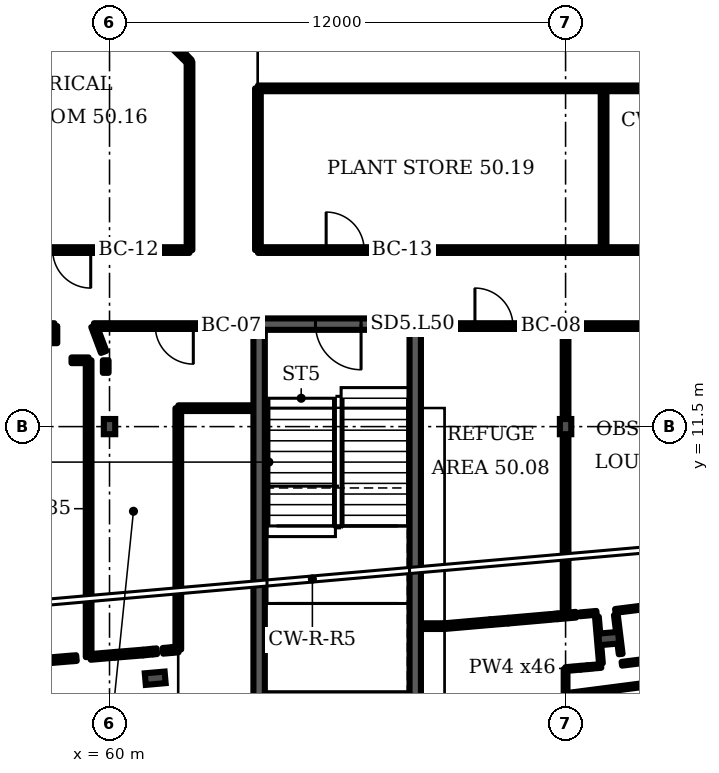
"""IFC4 building model, lengths in metres.
Left out: names, types, materials, properties, quantities, classifications, styles, units other than length and angle.
Written with IfcOpenShell. Run it as: python <this file> out.ifc"""

import sys

from ifc_helpers import new_model, si_unit, direction, frame, frame_2d, origin, origin_2d, place, context, subcontext, project, spatial, rectangle, i_section, extrude, element, fill, save


model = new_model("IFC4")
c1 = context("Model", 3, precision=1e-05, world=origin(), true_north=direction((0.0, 1.0)))
c2 = subcontext(c1, "Body", "Model", "MODEL_VIEW")
j1 = project(units=[si_unit("LENGTHUNIT", "METRE"), si_unit("PLANEANGLEUNIT", "RADIAN")], contexts=[c1])
p1 = place(None, origin())
s1 = spatial("IfcSite", under=j1, at=p1, CompositionType="ELEMENT")
p2 = place(p1, origin())
s2 = spatial("IfcBuilding", under=s1, at=p2, CompositionType="ELEMENT")
p3 = place(p2, frame((0.0, 0.0, 202.3)))
s3 = spatial("IfcBuildingStorey", under=s2, at=p3, CompositionType="ELEMENT", Elevation=202.3)
for number, where, z_axis, x_axis in (
    (1, (61.202, 4.879, 0.0), (0.0, 0.0, 1.0), (0.087, -0.996, 0.0)),
    (2, (73.135, 5.923, 0.0), (0.0, 0.0, 1.0), (0.087, -0.996, 0.0)),
):
    element("IfcColumn", number, at=place(p3, frame(where, z_axis=z_axis, x_axis=x_axis)), inside=s3, PredefinedType="COLUMN", context=c2, shape_type="SweptSolid", body=[
        extrude(i_section(OverallWidth=0.306, OverallDepth=0.524, WebThickness=0.021, FlangeThickness=0.04, FilletRadius=0.027, at=origin_2d()), origin(), (0.0, 0.0, 1.0), 4.8),
    ])
for number, where, z_axis, x_axis in (
    (3, (60.0, 11.5, 0.0), (0.0, 0.0, 1.0), (1.0, 0.0, 0.0)),
    (4, (72.0, 11.5, 0.0), (0.0, 0.0, 1.0), (1.0, 0.0, 0.0)),
):
    element("IfcColumn", number, at=place(p3, frame(where, z_axis=z_axis, x_axis=x_axis)), inside=s3, PredefinedType="COLUMN", context=c2, shape_type="SweptSolid", body=[
        extrude(i_section(OverallWidth=0.3, OverallDepth=0.4, WebThickness=0.013, FlangeThickness=0.024, FilletRadius=0.027, at=origin_2d()), origin(), (0.0, 0.0, 1.0), 4.8),
    ])
p4 = place(p3, frame((63.786, 14.196, 0.0), z_axis=(0.0, 0.0, 1.0), x_axis=(1.0, 0.0, 0.0)))
e5 = element("IfcWall", 5, at=p4, inside=s3, PredefinedType="SHEAR", context=c2, shape_type="SweptSolid", body=[
    extrude(rectangle(XDim=4.407, YDim=0.3, at=frame_2d((2.204, 0.0))), origin(), (0.0, 0.0, 1.0), 4.4),
])
p5 = place(p4, frame((1.632, 0.0, 0.0)))
e6 = element("IfcOpeningElement", 6, at=p5, cuts=e5, PredefinedType="OPENING", context=c2, shape_type="SweptSolid", body=[
    extrude(rectangle(XDim=1.2, YDim=2.1, at=frame_2d((0.6, 1.05))), frame((0.0, 0.16, 0.0), z_axis=(0.0, -1.0, 0.0), x_axis=(1.0, 0.0, 0.0)), (0.0, 0.0, 1.0), 0.32),
])
p6 = place(p3, frame((24.8, 16.145, 0.0), z_axis=(0.0, 0.0, 1.0), x_axis=(1.0, 0.0, 0.0)))
e7 = element("IfcWall", 7, at=p6, inside=s3, PredefinedType="PARTITIONING", context=c2, shape_type="SweptSolid", body=[
    extrude(rectangle(XDim=37.305, YDim=0.15, at=frame_2d((18.652, 0.0))), origin(), (0.0, 0.0, 1.0), 4.4),
])
p7 = place(p6, frame((23.78, 0.0, 0.0)))
e8 = element("IfcOpeningElement", 8, at=p7, cuts=e7, PredefinedType="OPENING", context=c2, shape_type="SweptSolid", body=[
    extrude(rectangle(XDim=1.0, YDim=2.1, at=frame_2d((0.5, 1.05))), frame((0.0, 0.085, 0.0), z_axis=(0.0, -1.0, 0.0), x_axis=(1.0, 0.0, 0.0)), (0.0, 0.0, 1.0), 0.17),
])
p8 = place(p6, frame((33.705, 0.0, 0.0)))
e9 = element("IfcOpeningElement", 9, at=p8, cuts=e7, PredefinedType="OPENING", context=c2, shape_type="SweptSolid", body=[
    extrude(rectangle(XDim=1.0, YDim=2.1, at=frame_2d((0.5, 1.05))), frame((0.0, 0.085, 0.0), z_axis=(0.0, -1.0, 0.0), x_axis=(1.0, 0.0, 0.0)), (0.0, 0.0, 1.0), 0.17),
])
p9 = place(p3, frame((52.5, 14.145, 0.0), z_axis=(0.0, 0.0, 1.0), x_axis=(1.0, 0.0, 0.0)))
e10 = element("IfcWall", 10, at=p9, inside=s3, PredefinedType="PARTITIONING", context=c2, shape_type="SweptSolid", body=[
    extrude(rectangle(XDim=6.05, YDim=0.15, at=frame_2d((3.025, 0.0))), origin(), (0.0, 0.0, 1.0), 4.4),
])
p10 = place(p9, frame((2.87, 0.0, 0.0)))
e11 = element("IfcOpeningElement", 11, at=p10, cuts=e10, PredefinedType="OPENING", context=c2, shape_type="SweptSolid", body=[
    extrude(rectangle(XDim=1.0, YDim=2.1, at=frame_2d((0.5, 1.05))), frame((0.0, 0.085, 0.0), z_axis=(0.0, -1.0, 0.0), x_axis=(1.0, 0.0, 0.0)), (0.0, 0.0, 1.0), 0.17),
])
p11 = place(p3, frame((57.345, 5.26, 0.0), z_axis=(0.0, 0.0, 1.0), x_axis=(0.996443, 0.084225, 0.0)))
e12 = element("IfcWall", 12, at=p11, inside=s3, PredefinedType="PARTITIONING", context=c2, shape_type="SweptSolid", body=[
    extrude(rectangle(XDim=1.661, YDim=0.15, at=frame_2d((0.831, 0.0))), origin(), (0.0, 0.0, 1.0), 4.4),
])
for number, where, z_axis, x_axis in (
    (13, (58.55, 13.695, 0.0), (0.0, 0.0, 1.0), (0.0, 1.0, 0.0)),
    (14, (59.0, 13.245, 0.0), (0.0, 0.0, 1.0), (1.0, 0.0, 0.0)),
):
    element("IfcWall", number, at=place(p3, frame(where, z_axis=z_axis, x_axis=x_axis)), inside=s3, PredefinedType="PARTITIONING", context=c2, shape_type="SweptSolid", body=[
        extrude(rectangle(XDim=0.45, YDim=0.15, at=frame_2d((0.225, 0.0))), origin(), (0.0, 0.0, 1.0), 4.4),
    ])
p12 = place(p3, frame((59.03, 5.4, 0.0), z_axis=(0.0, 0.0, 1.0), x_axis=(0.995017, 0.099745, 0.0)))
e15 = element("IfcWall", 15, at=p12, inside=s3, PredefinedType="PARTITIONING", context=c2, shape_type="SweptSolid", body=[
    extrude(rectangle(XDim=0.1, YDim=0.15, at=frame_2d((0.05, 0.0))), origin(), (0.0, 0.0, 1.0), 4.4),
])
p13 = place(p3, frame((59.45, 5.435, 0.0), z_axis=(0.0, 0.0, 1.0), x_axis=(0.0, 1.0, 0.0)))
e16 = element("IfcWall", 16, at=p13, inside=s3, PredefinedType="PARTITIONING", context=c2, shape_type="SweptSolid", body=[
    extrude(rectangle(XDim=7.81, YDim=0.15, at=frame_2d((3.905, 0.0))), origin(), (0.0, 0.0, 1.0), 4.4),
])
p14 = place(p3, frame((59.5, 5.44, 0.0), z_axis=(0.0, 0.0, 1.0), x_axis=(0.996305, 0.085908, 0.0)))
e17 = element("IfcWall", 17, at=p14, inside=s3, PredefinedType="PARTITIONING", context=c2, shape_type="SweptSolid", body=[
    extrude(rectangle(XDim=0.642, YDim=0.15, at=frame_2d((0.321, 0.0))), origin(), (0.0, 0.0, 1.0), 4.4),
])
p15 = place(p3, frame((59.59, 14.145, 0.0), z_axis=(0.0, 0.0, 1.0), x_axis=(1.0, 0.0, 0.0)))
e18 = element("IfcWall", 18, at=p15, inside=s3, PredefinedType="PARTITIONING", context=c2, shape_type="SweptSolid", body=[
    extrude(rectangle(XDim=4.176, YDim=0.15, at=frame_2d((2.088, 0.0))), origin(), (0.0, 0.0, 1.0), 4.4),
])
p16 = place(p15, frame((1.615, 0.0, 0.0)))
e19 = element("IfcOpeningElement", 19, at=p16, cuts=e18, PredefinedType="OPENING", context=c2, shape_type="SweptSolid", body=[
    extrude(rectangle(XDim=1.0, YDim=2.1, at=frame_2d((0.5, 1.05))), frame((0.0, 0.085, 0.0), z_axis=(0.0, -1.0, 0.0), x_axis=(1.0, 0.0, 0.0)), (0.0, 0.0, 1.0), 0.17),
])
p17 = place(p3, frame((59.845, 13.465, 0.0), z_axis=(0.0, 0.0, 1.0), x_axis=(-0.351013, 0.936371, 0.0)))
e20 = element("IfcWall", 20, at=p17, inside=s3, PredefinedType="PARTITIONING", context=c2, shape_type="SweptSolid", body=[
    extrude(rectangle(XDim=0.726, YDim=0.15, at=frame_2d((0.363, 0.0))), origin(), (0.0, 0.0, 1.0), 4.4),
])
p18 = place(p3, frame((59.9, 12.915, 0.0), z_axis=(0.0, 0.0, 1.0), x_axis=(0.0, 1.0, 0.0)))
e21 = element("IfcWall", 21, at=p18, inside=s3, PredefinedType="PARTITIONING", context=c2, shape_type="SweptSolid", body=[
    extrude(rectangle(XDim=0.33, YDim=0.15, at=frame_2d((0.165, 0.0))), origin(), (0.0, 0.0, 1.0), 4.4),
])
p19 = place(p3, frame((60.14, 5.495, 0.0), z_axis=(0.0, 0.0, 1.0), x_axis=(0.996753, 0.080569, 0.0)))
e22 = element("IfcWall", 22, at=p19, inside=s3, PredefinedType="PARTITIONING", context=c2, shape_type="SweptSolid", body=[
    extrude(rectangle(XDim=0.742, YDim=0.15, at=frame_2d((0.371, 0.0))), origin(), (0.0, 0.0, 1.0), 4.4),
])
p20 = place(p3, frame((60.885, 5.555, 0.0), z_axis=(0.0, 0.0, 1.0), x_axis=(0.994772, 0.102155, 0.0)))
e23 = element("IfcWall", 23, at=p20, inside=s3, PredefinedType="PARTITIONING", context=c2, shape_type="SweptSolid", body=[
    extrude(rectangle(XDim=0.246, YDim=0.15, at=frame_2d((0.123, 0.0))), origin(), (0.0, 0.0, 1.0), 4.4),
])
p21 = place(p3, frame((61.14, 5.58, 0.0), z_axis=(0.0, 0.0, 1.0), x_axis=(0.995505, 0.0947, 0.0)))
e24 = element("IfcWall", 24, at=p21, inside=s3, PredefinedType="PARTITIONING", context=c2, shape_type="SweptSolid", body=[
    extrude(rectangle(XDim=0.106, YDim=0.15, at=frame_2d((0.053, 0.0))), origin(), (0.0, 0.0, 1.0), 4.4),
])
p22 = place(p3, frame((61.405, 5.6, 0.0), z_axis=(0.0, 0.0, 1.0), x_axis=(0.996234, 0.086721, 0.0)))
e25 = element("IfcWall", 25, at=p22, inside=s3, PredefinedType="PARTITIONING", context=c2, shape_type="SweptSolid", body=[
    extrude(rectangle(XDim=0.231, YDim=0.15, at=frame_2d((0.115, 0.0))), origin(), (0.0, 0.0, 1.0), 4.4),
])
p23 = place(p3, frame((61.635, 5.62, 0.0), z_axis=(0.0, 0.0, 1.0), x_axis=(0.996405, 0.084771, 0.0)))
e26 = element("IfcWall", 26, at=p23, inside=s3, PredefinedType="PARTITIONING", context=c2, shape_type="SweptSolid", body=[
    extrude(rectangle(XDim=0.176, YDim=0.15, at=frame_2d((0.088, 0.0))), origin(), (0.0, 0.0, 1.0), 4.4),
])
p24 = place(p3, frame((61.81, 5.635, 0.0), z_axis=(0.0, 0.0, 1.0), x_axis=(0.0, 1.0, 0.0)))
e27 = element("IfcWall", 27, at=p24, inside=s3, PredefinedType="PARTITIONING", context=c2, shape_type="SweptSolid", body=[
    extrude(rectangle(XDim=6.35, YDim=0.15, at=frame_2d((3.175, 0.0))), origin(), (0.0, 0.0, 1.0), 4.4),
])
p25 = place(p3, frame((61.81, 11.985, 0.0), z_axis=(0.0, 0.0, 1.0), x_axis=(1.0, 0.0, 0.0)))
e28 = element("IfcWall", 28, at=p25, inside=s3, PredefinedType="PARTITIONING", context=c2, shape_type="SweptSolid", body=[
    extrude(rectangle(XDim=1.956, YDim=0.15, at=frame_2d((0.978, 0.0))), origin(), (0.0, 0.0, 1.0), 4.4),
])
p26 = place(p3, frame((61.97, 21.235, 0.0), z_axis=(0.0, 0.0, 1.0), x_axis=(-0.716792, 0.697287, 0.0)))
e29 = element("IfcWall", 29, at=p26, inside=s3, PredefinedType="PARTITIONING", context=c2, shape_type="SweptSolid", body=[
    extrude(rectangle(XDim=3.592, YDim=0.15, at=frame_2d((1.796, 0.0))), origin(), (0.0, 0.0, 1.0), 4.4),
])
p27 = place(p3, frame((62.105, 21.1, 0.0), z_axis=(0.0, 0.0, 1.0), x_axis=(-0.707107, 0.707107, 0.0)))
e30 = element("IfcWall", 30, at=p27, inside=s3, PredefinedType="PARTITIONING", context=c2, shape_type="SweptSolid", body=[
    extrude(rectangle(XDim=0.191, YDim=0.15, at=frame_2d((0.095, 0.0))), origin(), (0.0, 0.0, 1.0), 4.4),
])
p28 = place(p3, frame((62.105, 16.145, 0.0), z_axis=(0.0, 0.0, 1.0), x_axis=(0.0, 1.0, 0.0)))
e31 = element("IfcWall", 31, at=p28, inside=s3, PredefinedType="PARTITIONING", context=c2, shape_type="SweptSolid", body=[
    extrude(rectangle(XDim=4.955, YDim=0.15, at=frame_2d((2.478, 0.0))), origin(), (0.0, 0.0, 1.0), 4.4),
])
p29 = place(p3, frame((63.905, 16.145, 0.0), z_axis=(0.0, 0.0, 1.0), x_axis=(0.0, 1.0, 0.0)))
e32 = element("IfcWall", 32, at=p29, inside=s3, PredefinedType="PARTITIONING", context=c2, shape_type="SweptSolid", body=[
    extrude(rectangle(XDim=4.255, YDim=0.15, at=frame_2d((2.127, 0.0))), origin(), (0.0, 0.0, 1.0), 4.4),
])
p30 = place(p3, frame((63.905, 16.145, 0.0), z_axis=(0.0, 0.0, 1.0), x_axis=(1.0, 0.0, 0.0)))
e33 = element("IfcWall", 33, at=p30, inside=s3, PredefinedType="PARTITIONING", context=c2, shape_type="SweptSolid", body=[
    extrude(rectangle(XDim=15.325, YDim=0.15, at=frame_2d((7.662, 0.0))), origin(), (0.0, 0.0, 1.0), 4.4),
])
p31 = place(p30, frame((1.795, 0.0, 0.0)))
e34 = element("IfcOpeningElement", 34, at=p31, cuts=e33, PredefinedType="OPENING", context=c2, shape_type="SweptSolid", body=[
    extrude(rectangle(XDim=1.0, YDim=2.1, at=frame_2d((0.5, 1.05))), frame((0.0, 0.085, 0.0), z_axis=(0.0, -1.0, 0.0), x_axis=(1.0, 0.0, 0.0)), (0.0, 0.0, 1.0), 0.17),
])
p32 = place(p30, frame((11.713, 0.0, 0.0)))
e35 = element("IfcOpeningElement", 35, at=p32, cuts=e33, PredefinedType="OPENING", context=c2, shape_type="SweptSolid", body=[
    extrude(rectangle(XDim=1.0, YDim=2.1, at=frame_2d((0.5, 1.05))), frame((0.0, 0.085, 0.0), z_axis=(0.0, -1.0, 0.0), x_axis=(1.0, 0.0, 0.0)), (0.0, 0.0, 1.0), 0.17),
])
p33 = place(p3, frame((63.905, 20.4, 0.0), z_axis=(0.0, 0.0, 1.0), x_axis=(1.0, 0.0, 0.0)))
e36 = element("IfcWall", 36, at=p33, inside=s3, PredefinedType="PARTITIONING", context=c2, shape_type="SweptSolid", body=[
    extrude(rectangle(XDim=13.46, YDim=0.15, at=frame_2d((6.73, 0.0))), origin(), (0.0, 0.0, 1.0), 4.4),
])
p34 = place(p3, frame((68.214, 6.25, 0.0), z_axis=(0.0, 0.0, 1.0), x_axis=(1.0, 0.0, 0.0)))
e37 = element("IfcWall", 37, at=p34, inside=s3, PredefinedType="PARTITIONING", context=c2, shape_type="SweptSolid", body=[
    extrude(rectangle(XDim=0.596, YDim=0.15, at=frame_2d((0.298, 0.0))), origin(), (0.0, 0.0, 1.0), 4.4),
])
p35 = place(p3, frame((68.214, 14.145, 0.0), z_axis=(0.0, 0.0, 1.0), x_axis=(1.0, 0.0, 0.0)))
e38 = element("IfcWall", 38, at=p35, inside=s3, PredefinedType="PARTITIONING", context=c2, shape_type="SweptSolid", body=[
    extrude(rectangle(XDim=11.891, YDim=0.15, at=frame_2d((5.946, 0.0))), origin(), (0.0, 0.0, 1.0), 4.4),
])
p36 = place(p35, frame((1.401, 0.0, 0.0)))
e39 = element("IfcOpeningElement", 39, at=p36, cuts=e38, PredefinedType="OPENING", context=c2, shape_type="SweptSolid", body=[
    extrude(rectangle(XDim=1.0, YDim=2.1, at=frame_2d((0.5, 1.05))), frame((0.0, 0.085, 0.0), z_axis=(0.0, -1.0, 0.0), x_axis=(1.0, 0.0, 0.0)), (0.0, 0.0, 1.0), 0.17),
])
p37 = place(p35, frame((7.406, 0.0, 0.0)))
e40 = element("IfcOpeningElement", 40, at=p37, cuts=e38, PredefinedType="OPENING", context=c2, shape_type="SweptSolid", body=[
    extrude(rectangle(XDim=1.0, YDim=2.1, at=frame_2d((0.5, 1.05))), frame((0.0, 0.085, 0.0), z_axis=(0.0, -1.0, 0.0), x_axis=(1.0, 0.0, 0.0)), (0.0, 0.0, 1.0), 0.17),
])
p38 = place(p3, frame((68.81, 6.25, 0.0), z_axis=(0.0, 0.0, 1.0), x_axis=(0.996227, 0.086804, 0.0)))
e41 = element("IfcWall", 41, at=p38, inside=s3, PredefinedType="PARTITIONING", context=c2, shape_type="SweptSolid", body=[
    extrude(rectangle(XDim=1.209, YDim=0.15, at=frame_2d((0.605, 0.0))), origin(), (0.0, 0.0, 1.0), 4.4),
])
p39 = place(p3, frame((70.015, 6.355, 0.0), z_axis=(0.0, 0.0, 1.0), x_axis=(0.996536, 0.083173, 0.0)))
e42 = element("IfcWall", 42, at=p39, inside=s3, PredefinedType="PARTITIONING", context=c2, shape_type="SweptSolid", body=[
    extrude(rectangle(XDim=0.476, YDim=0.15, at=frame_2d((0.238, 0.0))), origin(), (0.0, 0.0, 1.0), 4.4),
])
p40 = place(p3, frame((70.489, 6.395, 0.0), z_axis=(0.0, 0.0, 1.0), x_axis=(0.996196, 0.087119, 0.0)))
e43 = element("IfcWall", 43, at=p40, inside=s3, PredefinedType="PARTITIONING", context=c2, shape_type="SweptSolid", body=[
    extrude(rectangle(XDim=1.141, YDim=0.15, at=frame_2d((0.57, 0.0))), origin(), (0.0, 0.0, 1.0), 4.4),
])
p41 = place(p3, frame((71.68, 6.5, 0.0), z_axis=(0.0, 0.0, 1.0), x_axis=(0.997064, 0.076524, 0.0)))
e44 = element("IfcWall", 44, at=p41, inside=s3, PredefinedType="PARTITIONING", context=c2, shape_type="SweptSolid", body=[
    extrude(rectangle(XDim=0.108, YDim=0.15, at=frame_2d((0.054, 0.0))), origin(), (0.0, 0.0, 1.0), 4.4),
])
p42 = place(p3, frame((71.788, 6.508, 0.0), z_axis=(0.0, 0.0, 1.0), x_axis=(0.996212, 0.086911, 0.0)))
e45 = element("IfcWall", 45, at=p42, inside=s3, PredefinedType="PARTITIONING", context=c2, shape_type="SweptSolid", body=[
    extrude(rectangle(XDim=0.486, YDim=0.15, at=frame_2d((0.243, 0.0))), origin(), (0.0, 0.0, 1.0), 4.4),
])
p43 = place(p3, frame((72.0, 4.435, 0.0), z_axis=(0.0, 0.0, 1.0), x_axis=(0.991735, 0.128315, 0.0)))
e46 = element("IfcWall", 46, at=p43, inside=s3, PredefinedType="PARTITIONING", context=c2, shape_type="SweptSolid", body=[
    extrude(rectangle(XDim=7.713, YDim=0.1, at=frame_2d((3.857, 0.0))), origin(), (0.0, 0.0, 1.0), 4.4),
])
p44 = place(p3, frame((72.0, 4.435, 0.0), z_axis=(0.0, 0.0, 1.0), x_axis=(0.0, 1.0, 0.0)))
e47 = element("IfcWall", 47, at=p44, inside=s3, PredefinedType="PARTITIONING", context=c2, shape_type="SweptSolid", body=[
    extrude(rectangle(XDim=0.685, YDim=0.1, at=frame_2d((0.343, 0.0))), origin(), (0.0, 0.0, 1.0), 4.4),
])
p45 = place(p3, frame((72.0, 5.12, 0.0), z_axis=(0.0, 0.0, 1.0), x_axis=(0.996121, 0.088038, 0.0)))
e48 = element("IfcWall", 48, at=p45, inside=s3, PredefinedType="PARTITIONING", context=c2, shape_type="SweptSolid", body=[
    extrude(rectangle(XDim=0.396, YDim=0.1, at=frame_2d((0.198, 0.0))), origin(), (0.0, 0.0, 1.0), 4.4),
])
p46 = place(p3, frame((72.0, 6.527, 0.0), z_axis=(0.0, 0.0, 1.0), x_axis=(0.0, 1.0, 0.0)))
e49 = element("IfcWall", 49, at=p46, inside=s3, PredefinedType="PARTITIONING", context=c2, shape_type="SweptSolid", body=[
    extrude(rectangle(XDim=7.618, YDim=0.15, at=frame_2d((3.809, 0.0))), origin(), (0.0, 0.0, 1.0), 4.4),
])
p47 = place(p3, frame((72.375, 6.56, 0.0), z_axis=(0.0, 0.0, 1.0), x_axis=(0.99588, 0.090635, 0.0)))
e50 = element("IfcWall", 50, at=p47, inside=s3, PredefinedType="PARTITIONING", context=c2, shape_type="SweptSolid", body=[
    extrude(rectangle(XDim=0.442, YDim=0.1, at=frame_2d((0.221, 0.0))), origin(), (0.0, 0.0, 1.0), 4.4),
])
p48 = place(p3, frame((72.395, 5.155, 0.0), z_axis=(0.0, 0.0, 1.0), x_axis=(0.996593, 0.082486, 0.0)))
e51 = element("IfcWall", 51, at=p48, inside=s3, PredefinedType="PARTITIONING", context=c2, shape_type="SweptSolid", body=[
    extrude(rectangle(XDim=0.181, YDim=0.1, at=frame_2d((0.09, 0.0))), origin(), (0.0, 0.0, 1.0), 4.4),
])
p49 = place(p3, frame((72.575, 5.17, 0.0), z_axis=(0.0, 0.0, 1.0), x_axis=(0.996069, 0.088603, 0.0)))
e52 = element("IfcWall", 52, at=p49, inside=s3, PredefinedType="PARTITIONING", context=c2, shape_type="SweptSolid", body=[
    extrude(rectangle(XDim=0.171, YDim=0.1, at=frame_2d((0.085, 0.0))), origin(), (0.0, 0.0, 1.0), 4.4),
])
p50 = place(p3, frame((72.796, 5.191, 0.0), z_axis=(0.0, 0.0, 1.0), x_axis=(0.996205, 0.087081, 0.0)))
e53 = element("IfcWall", 53, at=p50, inside=s3, PredefinedType="PARTITIONING", context=c2, shape_type="SweptSolid", body=[
    extrude(rectangle(XDim=0.14, YDim=0.1, at=frame_2d((0.07, 0.0))), origin(), (0.0, 0.0, 1.0), 4.4),
])
p51 = place(p3, frame((72.93, 5.27, 0.0), z_axis=(0.0, 0.0, 1.0), x_axis=(-0.085711, 0.996316, 0.0)))
e54 = element("IfcWall", 54, at=p51, inside=s3, PredefinedType="PARTITIONING", context=c2, shape_type="SweptSolid", body=[
    extrude(rectangle(XDim=1.228, YDim=0.1, at=frame_2d((0.614, 0.0))), origin(), (0.0, 0.0, 1.0), 4.4),
])
p52 = place(p3, frame((73.0, 16.145, 0.0), z_axis=(0.0, 0.0, 1.0), x_axis=(0.0, 1.0, 0.0)))
e55 = element("IfcWall", 55, at=p52, inside=s3, PredefinedType="PARTITIONING", context=c2, shape_type="SweptSolid", body=[
    extrude(rectangle(XDim=4.255, YDim=0.15, at=frame_2d((2.127, 0.0))), origin(), (0.0, 0.0, 1.0), 4.4),
])
p53 = place(p3, frame((73.309, 6.65, 0.0), z_axis=(0.0, 0.0, 1.0), x_axis=(0.99228, 0.124035, 0.0)))
e56 = element("IfcWall", 56, at=p53, inside=s3, PredefinedType="PARTITIONING", context=c2, shape_type="SweptSolid", body=[
    extrude(rectangle(XDim=0.679, YDim=0.1, at=frame_2d((0.339, 0.0))), origin(), (0.0, 0.0, 1.0), 4.4),
])
p54 = place(p3, frame((73.45, 5.515, 0.0), z_axis=(0.0, 0.0, 1.0), x_axis=(-0.122241, 0.992503, 0.0)))
e57 = element("IfcWall", 57, at=p54, inside=s3, PredefinedType="PARTITIONING", context=c2, shape_type="SweptSolid", body=[
    extrude(rectangle(XDim=1.039, YDim=0.1, at=frame_2d((0.519, 0.0))), origin(), (0.0, 0.0, 1.0), 4.4),
])
p55 = place(p3, frame((73.48, 5.26, 0.0), z_axis=(0.0, 0.0, 1.0), x_axis=(0.992307, 0.123821, 0.0)))
e58 = element("IfcWall", 58, at=p55, inside=s3, PredefinedType="PARTITIONING", context=c2, shape_type="SweptSolid", body=[
    extrude(rectangle(XDim=2.948, YDim=0.1, at=frame_2d((1.474, 0.0))), origin(), (0.0, 0.0, 1.0), 4.4),
])
for number, where, z_axis, x_axis in (
    (59, (63.936, 4.184, 0.0), (0.0, 0.0, 1.0), (0.0, 1.0, 0.0)),
    (60, (68.044, 4.184, 0.0), (0.0, 0.0, 1.0), (0.0, 1.0, 0.0)),
):
    element("IfcWall", number, at=place(p3, frame(where, z_axis=z_axis, x_axis=x_axis)), inside=s3, PredefinedType="SHEAR", context=c2, shape_type="SweptSolid", body=[
        extrude(rectangle(XDim=9.863, YDim=0.3, at=frame_2d((4.931, 0.0))), origin(), (0.0, 0.0, 1.0), 4.4),
    ])
p56 = place(p5, origin())
e61 = element("IfcDoor", 61, at=p56, inside=s3, OperationType="SINGLE_SWING_RIGHT", PredefinedType="DOOR", context=c2, shape_type="SweptSolid", body=[
    extrude(rectangle(XDim=1.2, YDim=2.1, at=frame_2d((0.6, 1.05))), frame((0.0, 0.025, 0.0), z_axis=(0.0, -1.0, 0.0), x_axis=(1.0, 0.0, 0.0)), (0.0, 0.0, 1.0), 0.05),
])
fill(e6, e61)
p57 = place(p16, origin())
e62 = element("IfcDoor", 62, at=p57, inside=s3, OperationType="SINGLE_SWING_RIGHT", PredefinedType="DOOR", context=c2, shape_type="SweptSolid", body=[
    extrude(rectangle(XDim=1.0, YDim=2.1, at=frame_2d((0.5, 1.05))), frame((0.0, 0.025, 0.0), z_axis=(0.0, -1.0, 0.0), x_axis=(1.0, 0.0, 0.0)), (0.0, 0.0, 1.0), 0.05),
])
fill(e19, e62)
p58 = place(p36, origin())
e63 = element("IfcDoor", 63, at=p58, inside=s3, OperationType="SINGLE_SWING_LEFT", PredefinedType="DOOR", context=c2, shape_type="SweptSolid", body=[
    extrude(rectangle(XDim=1.0, YDim=2.1, at=frame_2d((0.5, 1.05))), frame((0.0, 0.025, 0.0), z_axis=(0.0, -1.0, 0.0), x_axis=(1.0, 0.0, 0.0)), (0.0, 0.0, 1.0), 0.05),
])
fill(e39, e63)
p59 = place(p8, origin())
e64 = element("IfcDoor", 64, at=p59, inside=s3, OperationType="SINGLE_SWING_RIGHT", PredefinedType="DOOR", context=c2, shape_type="SweptSolid", body=[
    extrude(rectangle(XDim=1.0, YDim=2.1, at=frame_2d((0.5, 1.05))), frame((0.0, 0.025, 0.0), z_axis=(0.0, -1.0, 0.0), x_axis=(1.0, 0.0, 0.0)), (0.0, 0.0, 1.0), 0.05),
])
fill(e9, e64)
p60 = place(p31, origin())
e65 = element("IfcDoor", 65, at=p60, inside=s3, OperationType="SINGLE_SWING_LEFT", PredefinedType="DOOR", context=c2, shape_type="SweptSolid", body=[
    extrude(rectangle(XDim=1.0, YDim=2.1, at=frame_2d((0.5, 1.05))), frame((0.0, 0.025, 0.0), z_axis=(0.0, -1.0, 0.0), x_axis=(1.0, 0.0, 0.0)), (0.0, 0.0, 1.0), 0.05),
])
fill(e34, e65)
save(model, sys.argv[1])
